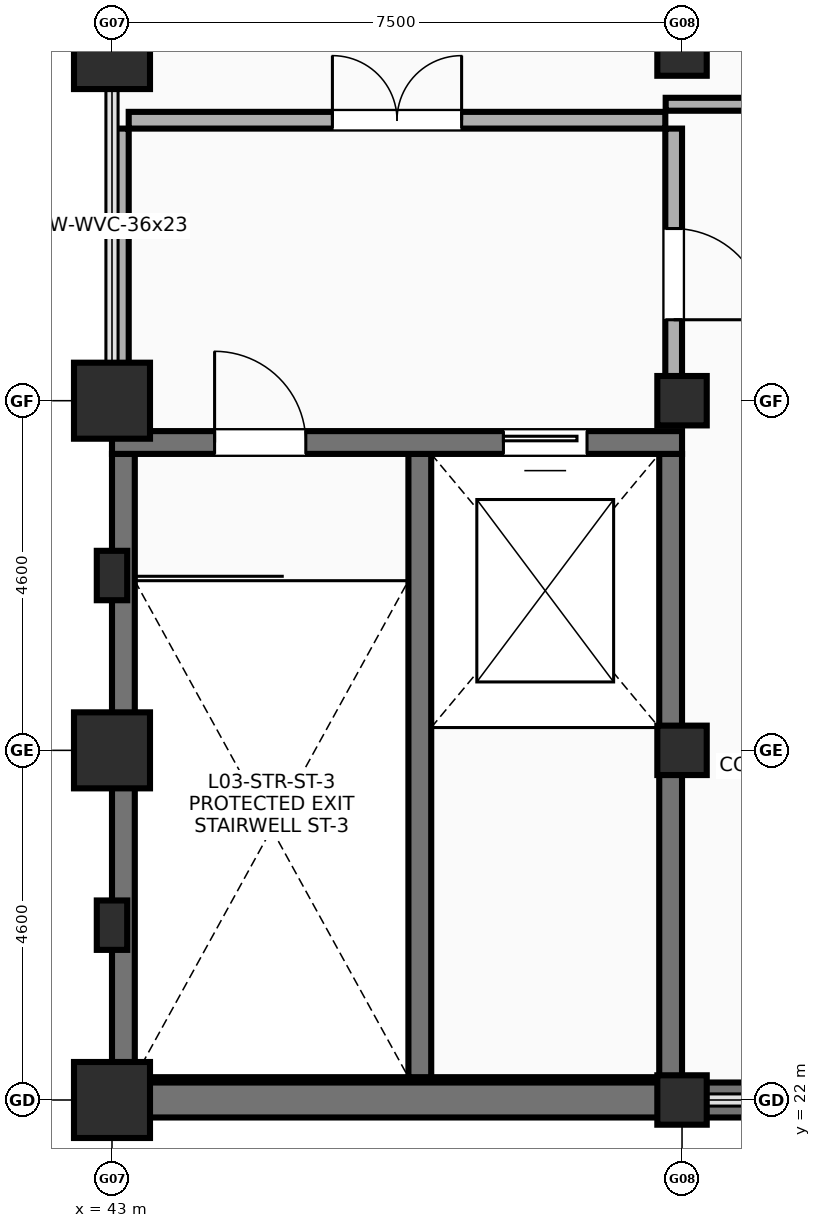
"""IFC4 building model, lengths in metres.
Left out: names, types, materials, properties, quantities, classifications, styles, units other than length and angle.
Written with IfcOpenShell. Run it as: python <this file> out.ifc"""

import sys

from ifc_helpers import new_model, si_unit, direction, frame, frame_2d, origin, origin_2d, place, context, subcontext, project, spatial, polyline, rectangle, outline, extrude, element, fill, save


model = new_model("IFC4")
c1 = context("Model", 3, precision=1e-05, world=origin(), true_north=direction((0.0, 1.0)))
c2 = subcontext(c1, "Body", "Model", "MODEL_VIEW")
j1 = project(units=[si_unit("LENGTHUNIT", "METRE"), si_unit("PLANEANGLEUNIT", "RADIAN")], contexts=[c1])
p1 = place(None, origin())
s1 = spatial("IfcSite", under=j1, at=p1, CompositionType="ELEMENT")
p2 = place(p1, origin())
s2 = spatial("IfcBuilding", under=s1, at=p2, CompositionType="ELEMENT")
p3 = place(p2, frame((0.0, 0.0, 14.2)))
s3 = spatial("IfcBuildingStorey", under=s2, at=p3, CompositionType="ELEMENT", Elevation=14.2)
for number, where, z_axis, x_axis in (
    (1, (43.0, 22.0, 0.0), (0.0, 0.0, 1.0), (1.0, 0.0, 0.0)),
    (2, (43.0, 26.6, 0.0), (0.0, 0.0, 1.0), (1.0, 0.0, 0.0)),
    (3, (43.0, 31.2, 0.0), (0.0, 0.0, 1.0), (1.0, 0.0, 0.0)),
    (4, (43.0, 35.8, 0.0), (0.0, 0.0, 1.0), (1.0, 0.0, 0.0)),
):
    element("IfcColumn", number, at=place(p3, frame(where, z_axis=z_axis, x_axis=x_axis)), inside=s3, PredefinedType="COLUMN", context=c2, shape_type="SweptSolid", body=[
        extrude(rectangle(XDim=1.0, YDim=1.0, at=origin_2d()), origin(), (0.0, 0.0, 1.0), 3.8),
    ])
for number, where, z_axis, x_axis in (
    (5, (50.5, 22.0, 0.0), (0.0, 0.0, 1.0), (1.0, 0.0, 0.0)),
    (6, (50.5, 26.6, 0.0), (0.0, 0.0, 1.0), (1.0, 0.0, 0.0)),
    (7, (50.5, 31.2, 0.0), (0.0, 0.0, 1.0), (1.0, 0.0, 0.0)),
    (8, (50.5, 35.8, 0.0), (0.0, 0.0, 1.0), (1.0, 0.0, 0.0)),
):
    element("IfcColumn", number, at=place(p3, frame(where, z_axis=z_axis, x_axis=x_axis)), inside=s3, PredefinedType="COLUMN", context=c2, shape_type="SweptSolid", body=[
        extrude(rectangle(XDim=0.65, YDim=0.65, at=origin_2d()), origin(), (0.0, 0.0, 1.0), 3.8),
    ])
for number, where, z_axis, x_axis in (
    (9, (43.0, 24.3, 0.0), (0.0, 0.0, 1.0), (1.0, 0.0, 0.0)),
    (10, (43.0, 28.9, 0.0), (0.0, 0.0, 1.0), (1.0, 0.0, 0.0)),
):
    element("IfcColumn", number, at=place(p3, frame(where, z_axis=z_axis, x_axis=x_axis)), inside=s3, PredefinedType="PILASTER", context=c2, shape_type="SweptSolid", body=[
        extrude(rectangle(XDim=0.4, YDim=0.65, at=origin_2d()), origin(), (0.0, 0.0, 1.0), 3.8),
    ])
p4 = place(p3, frame((43.0, 22.15, 0.0), z_axis=(0.0, 0.0, 1.0), x_axis=(1.0, 0.0, 0.0)))
e11 = element("IfcWall", 11, at=p4, inside=s3, PredefinedType="SHEAR", context=c2, shape_type="SweptSolid", body=[
    extrude(rectangle(XDim=7.5, YDim=0.3, at=frame_2d((3.75, 0.0))), origin(), (0.0, 0.0, 1.0), 3.8),
])
for number, where, z_axis, x_axis in (
    (12, (43.15, 22.3, 0.0), (0.0, 0.0, 1.0), (0.0, 1.0, 0.0)),
    (13, (50.35, 22.3, 0.0), (0.0, 0.0, 1.0), (0.0, 1.0, 0.0)),
    (14, (47.05, 22.3, 0.0), (0.0, 0.0, 1.0), (0.0, 1.0, 0.0)),
):
    element("IfcWall", number, at=place(p3, frame(where, z_axis=z_axis, x_axis=x_axis)), inside=s3, PredefinedType="SHEAR", context=c2, shape_type="SweptSolid", body=[
        extrude(rectangle(XDim=8.2, YDim=0.3, at=frame_2d((4.1, 0.0))), origin(), (0.0, 0.0, 1.0), 3.8),
    ])
p5 = place(p3, frame((43.14, 22.0, 3.8), z_axis=(0.0, 0.0, 1.0), x_axis=(1.0, 0.0, 0.0)))
e15 = element("IfcWall", 15, at=p5, inside=s3, PredefinedType="SOLIDWALL", context=c2, shape_type="SweptSolid", body=[
    extrude(outline(polyline([(0.0, 0.0), (29.72, 0.0), (29.72, 2.177), (28.877, 3.859), (28.092, 5.46), (27.125, 6.958), (25.99, 8.333), (24.701, 9.565), (23.277, 10.637), (21.737, 11.536), (20.102, 12.248), (18.395, 12.763), (16.64, 13.076), (14.86, 13.18), (13.08, 13.076), (11.325, 12.763), (9.618, 12.248), (7.983, 11.536), (6.443, 10.637), (5.019, 9.565), (3.73, 8.333), (2.595, 6.958), (1.628, 5.46), (0.843, 3.859), (0.0, 2.177), (0.0, 0.0)])), frame((0.0, 0.23, 0.0), z_axis=(0.0, -1.0, 0.0), x_axis=(1.0, 0.0, 0.0)), (0.0, 0.0, 1.0), 0.46),
])
p6 = place(p5, frame((11.86, 0.0, 3.6)))
e16 = element("IfcOpeningElement", 16, at=p6, cuts=e15, PredefinedType="OPENING", context=c2, shape_type="SweptSolid", body=[
    extrude(outline(polyline([(6.0, 3.0), (5.898, 3.776), (5.598, 4.5), (5.121, 5.121), (4.5, 5.598), (3.776, 5.898), (3.0, 6.0), (2.224, 5.898), (1.5, 5.598), (0.879, 5.121), (0.402, 4.5), (0.102, 3.776), (0.0, 3.0), (0.102, 2.224), (0.402, 1.5), (0.879, 0.879), (1.5, 0.402), (2.224, 0.102), (3.0, 0.0), (3.776, 0.102), (4.5, 0.402), (5.121, 0.879), (5.598, 1.5), (5.898, 2.224), (6.0, 3.0)])), frame((0.0, 0.24, 0.0), z_axis=(0.0, -1.0, 0.0), x_axis=(1.0, 0.0, 0.0)), (0.0, 0.0, 1.0), 0.48),
])
p7 = place(p3, frame((43.0, 30.65, 0.0), z_axis=(0.0, 0.0, 1.0), x_axis=(1.0, 0.0, 0.0)))
e17 = element("IfcWall", 17, at=p7, inside=s3, PredefinedType="SHEAR", context=c2, shape_type="SweptSolid", body=[
    extrude(rectangle(XDim=7.5, YDim=0.3, at=frame_2d((3.75, 0.0))), origin(), (0.0, 0.0, 1.0), 3.8),
])
p8 = place(p7, frame((1.35, 0.0, 0.0)))
e18 = element("IfcOpeningElement", 18, at=p8, cuts=e17, PredefinedType="OPENING", context=c2, shape_type="SweptSolid", body=[
    extrude(rectangle(XDim=1.2, YDim=2.15, at=frame_2d((0.6, 1.075))), frame((0.0, 0.16, 0.0), z_axis=(0.0, -1.0, 0.0), x_axis=(1.0, 0.0, 0.0)), (0.0, 0.0, 1.0), 0.32),
])
p9 = place(p7, frame((5.15, 0.0, 0.0)))
e19 = element("IfcOpeningElement", 19, at=p9, cuts=e17, PredefinedType="OPENING", context=c2, shape_type="SweptSolid", body=[
    extrude(rectangle(XDim=1.1, YDim=2.15, at=frame_2d((0.55, 1.075))), frame((0.0, 0.16, 0.0), z_axis=(0.0, -1.0, 0.0), x_axis=(1.0, 0.0, 0.0)), (0.0, 0.0, 1.0), 0.32),
])
p10 = place(p3, frame((43.22, 34.89, 0.0), z_axis=(0.0, 0.0, 1.0), x_axis=(1.0, 0.0, 0.0)))
e20 = element("IfcWall", 20, at=p10, inside=s3, PredefinedType="SOLIDWALL", context=c2, shape_type="SweptSolid", body=[
    extrude(rectangle(XDim=7.06, YDim=0.22, at=frame_2d((3.53, 0.0))), origin(), (0.0, 0.0, 1.0), 2.38),
])
p11 = place(p10, frame((2.68, 0.0, 0.0)))
e21 = element("IfcOpeningElement", 21, at=p11, cuts=e20, PredefinedType="OPENING", context=c2, shape_type="SweptSolid", body=[
    extrude(rectangle(XDim=1.7, YDim=2.18, at=frame_2d((0.85, 1.09))), frame((0.0, 0.12, 0.0), z_axis=(0.0, -1.0, 0.0), x_axis=(1.0, 0.0, 0.0)), (0.0, 0.0, 1.0), 0.24),
])
p12 = place(p3, frame((43.11, 30.95, 0.0), z_axis=(0.0, 0.0, 1.0), x_axis=(0.0, 1.0, 0.0)))
e22 = element("IfcWall", 22, at=p12, inside=s3, PredefinedType="SOLIDWALL", context=c2, shape_type="SweptSolid", body=[
    extrude(rectangle(XDim=3.83, YDim=0.22, at=frame_2d((1.915, 0.0))), origin(), (0.0, 0.0, 1.0), 2.38),
])
p13 = place(p3, frame((50.39, 30.95, 0.0), z_axis=(0.0, 0.0, 1.0), x_axis=(0.0, 1.0, 0.0)))
e23 = element("IfcWall", 23, at=p13, inside=s3, PredefinedType="SOLIDWALL", context=c2, shape_type="SweptSolid", body=[
    extrude(rectangle(XDim=3.83, YDim=0.22, at=frame_2d((1.915, 0.0))), origin(), (0.0, 0.0, 1.0), 2.7),
])
p14 = place(p13, frame((2.515, 0.0, 0.0), z_axis=(0.0, 0.0, 1.0), x_axis=(-1.0, 0.0, 0.0)))
e24 = element("IfcOpeningElement", 24, at=p14, cuts=e23, PredefinedType="OPENING", context=c2, shape_type="SweptSolid", body=[
    extrude(rectangle(XDim=1.2, YDim=2.15, at=frame_2d((0.6, 1.075))), frame((0.0, 0.12, 0.0), z_axis=(0.0, -1.0, 0.0), x_axis=(1.0, 0.0, 0.0)), (0.0, 0.0, 1.0), 0.24),
])
p15 = place(p3, frame((50.285, 35.1, 0.0), z_axis=(0.0, 0.0, 1.0), x_axis=(1.0, 0.0, 0.0)))
e25 = element("IfcWall", 25, at=p15, inside=s3, PredefinedType="PARTITIONING", context=c2, shape_type="SweptSolid", body=[
    extrude(rectangle(XDim=17.525, YDim=0.17, at=frame_2d((8.763, 0.0))), origin(), (0.0, 0.0, 1.0), 2.9),
])
p16 = place(p15, frame((8.265, 0.0, 0.0)))
e26 = element("IfcOpeningElement", 26, at=p16, cuts=e25, PredefinedType="OPENING", context=c2, shape_type="SweptSolid", body=[
    extrude(rectangle(XDim=1.85, YDim=2.3, at=frame_2d((0.925, 1.15))), frame((0.0, 0.095, 0.0), z_axis=(0.0, -1.0, 0.0), x_axis=(1.0, 0.0, 0.0)), (0.0, 0.0, 1.0), 0.19),
])
p17 = place(p8, origin())
e27 = element("IfcDoor", 27, at=p17, inside=s3, OperationType="SINGLE_SWING_LEFT", PredefinedType="DOOR", context=c2, shape_type="SweptSolid", body=[
    extrude(rectangle(XDim=1.2, YDim=2.15, at=frame_2d((0.6, 1.075))), frame((0.0, 0.025, 0.0), z_axis=(0.0, -1.0, 0.0), x_axis=(1.0, 0.0, 0.0)), (0.0, 0.0, 1.0), 0.05),
])
fill(e18, e27)
p18 = place(p9, origin())
e28 = element("IfcDoor", 28, at=p18, inside=s3, OperationType="SLIDING_TO_LEFT", PredefinedType="DOOR", context=c2, shape_type="SweptSolid", body=[
    extrude(rectangle(XDim=1.1, YDim=2.15, at=frame_2d((0.55, 1.075))), frame((0.0, 0.025, 0.0), z_axis=(0.0, -1.0, 0.0), x_axis=(1.0, 0.0, 0.0)), (0.0, 0.0, 1.0), 0.05),
])
fill(e19, e28)
p19 = place(p11, origin())
e29 = element("IfcDoor", 29, at=p19, inside=s3, OperationType="DOUBLE_DOOR_SINGLE_SWING", PredefinedType="DOOR", context=c2, shape_type="SweptSolid", body=[
    extrude(rectangle(XDim=1.7, YDim=2.18, at=frame_2d((0.85, 1.09))), frame((0.0, 0.025, 0.0), z_axis=(0.0, -1.0, 0.0), x_axis=(1.0, 0.0, 0.0)), (0.0, 0.0, 1.0), 0.05),
])
fill(e21, e29)
p20 = place(p14, origin())
e30 = element("IfcDoor", 30, at=p20, inside=s3, OperationType="SINGLE_SWING_RIGHT", PredefinedType="DOOR", context=c2, shape_type="SweptSolid", body=[
    extrude(rectangle(XDim=1.2, YDim=2.15, at=frame_2d((0.6, 1.075))), frame((0.0, 0.025, 0.0), z_axis=(0.0, -1.0, 0.0), x_axis=(1.0, 0.0, 0.0)), (0.0, 0.0, 1.0), 0.05),
])
fill(e24, e30)
save(model, sys.argv[1])
